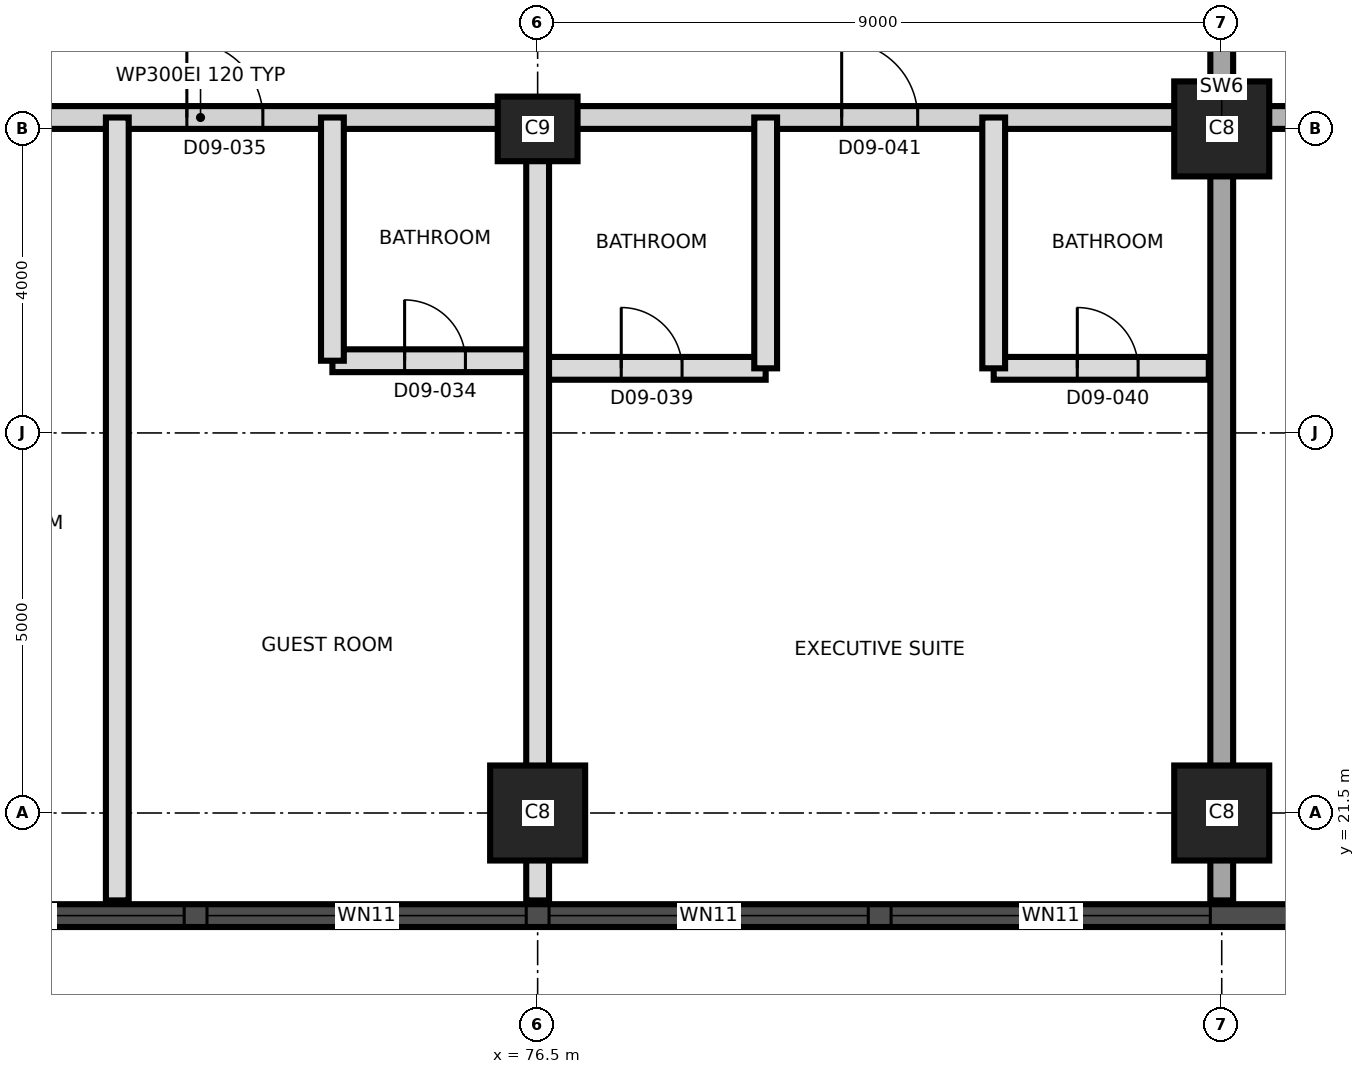
"""IFC4 building model, lengths in metres.
Left out: names, types, materials, properties, quantities, classifications, styles, units other than length and angle.
Written with IfcOpenShell. Run it as: python <this file> out.ifc"""

import sys

from ifc_helpers import new_model, si_unit, direction, frame, frame_2d, origin, origin_2d, place, context, subcontext, project, spatial, rectangle, extrude, element, fill, save


model = new_model("IFC4")
c1 = context("Model", 3, precision=1e-05, world=origin(), true_north=direction((0.0, 1.0)))
c2 = subcontext(c1, "Body", "Model", "MODEL_VIEW")
j1 = project(units=[si_unit("LENGTHUNIT", "METRE"), si_unit("PLANEANGLEUNIT", "RADIAN")], contexts=[c1])
p1 = place(None, origin())
s1 = spatial("IfcSite", under=j1, at=p1, CompositionType="ELEMENT")
p2 = place(p1, origin())
s2 = spatial("IfcBuilding", under=s1, at=p2, CompositionType="ELEMENT")
p3 = place(p2, frame((0.0, 0.0, 113.0)))
s3 = spatial("IfcBuildingStorey", under=s2, at=p3, CompositionType="ELEMENT", Elevation=113.0)
for number, where, z_axis, x_axis in (
    (1, (76.5, 21.5, 0.0), (0.0, 0.0, 1.0), (1.0, 0.0, 0.0)),
    (2, (85.5, 21.5, 0.0), (0.0, 0.0, 1.0), (1.0, 0.0, 0.0)),
):
    element("IfcColumn", number, at=place(p3, frame(where, z_axis=z_axis, x_axis=x_axis)), inside=s3, PredefinedType="COLUMN", context=c2, shape_type="SweptSolid", body=[
        extrude(rectangle(XDim=1.25, YDim=1.25, at=origin_2d()), origin(), (0.0, 0.0, 1.0), 3.7),
    ])
p4 = place(p3, frame((76.5, 30.5, 0.0), z_axis=(0.0, 0.0, 1.0), x_axis=(1.0, 0.0, 0.0)))
e3 = element("IfcColumn", 3, at=p4, inside=s3, PredefinedType="COLUMN", context=c2, shape_type="SweptSolid", body=[
    extrude(rectangle(XDim=1.05, YDim=0.85, at=origin_2d()), origin(), (0.0, 0.0, 1.0), 3.7),
])
p5 = place(p3, frame((85.5, 30.5, 0.0), z_axis=(0.0, 0.0, 1.0), x_axis=(1.0, 0.0, 0.0)))
e4 = element("IfcColumn", 4, at=p5, inside=s3, PredefinedType="COLUMN", context=c2, shape_type="SweptSolid", body=[
    extrude(rectangle(XDim=1.25, YDim=1.25, at=origin_2d()), origin(), (0.0, 0.0, 1.0), 3.7),
])
p6 = place(p3, frame((85.5, 20.35, 0.0), z_axis=(0.0, 0.0, 1.0), x_axis=(0.0, 1.0, 0.0)))
e5 = element("IfcWall", 5, at=p6, inside=s3, PredefinedType="SHEAR", context=c2, shape_type="SweptSolid", body=[
    extrude(rectangle(XDim=20.3, YDim=0.3, at=frame_2d((10.15, 0.0))), origin(), (0.0, 0.0, 1.0), 3.7),
])
p7 = place(p6, frame((11.35, 0.0, 0.0)))
e6 = element("IfcOpeningElement", 6, at=p7, cuts=e5, PredefinedType="OPENING", context=c2, shape_type="SweptSolid", body=[
    extrude(rectangle(XDim=1.4, YDim=2.1, at=frame_2d((0.7, 1.05))), frame((0.0, 0.16, 0.0), z_axis=(0.0, -1.0, 0.0), x_axis=(1.0, 0.0, 0.0)), (0.0, 0.0, 1.0), 0.32),
])
p8 = place(p3, frame((44.011, 20.15, 0.0), z_axis=(0.0, 0.0, 1.0), x_axis=(1.0, 0.0, 0.0)))
e7 = element("IfcWall", 7, at=p8, inside=s3, PredefinedType="SOLIDWALL", context=c2, shape_type="SweptSolid", body=[
    extrude(rectangle(XDim=43.476, YDim=0.3, at=frame_2d((21.738, 0.0))), origin(), (0.0, 0.0, 1.0), 3.4),
])
p9 = place(p8, frame((1.845, 0.0, 0.3)))
e8 = element("IfcOpeningElement", 8, at=p9, cuts=e7, PredefinedType="OPENING", context=c2, shape_type="SweptSolid", body=[
    extrude(rectangle(XDim=1.8, YDim=2.4, at=frame_2d((0.9, 1.2))), frame((0.0, 0.16, 0.0), z_axis=(0.0, -1.0, 0.0), x_axis=(1.0, 0.0, 0.0)), (0.0, 0.0, 1.0), 0.32),
])
p10 = place(p8, frame((5.639, 0.0, 0.9)))
e9 = element("IfcOpeningElement", 9, at=p10, cuts=e7, PredefinedType="OPENING", context=c2, shape_type="SweptSolid", body=[
    extrude(rectangle(XDim=4.2, YDim=1.5, at=frame_2d((2.1, 0.75))), frame((0.0, 0.16, 0.0), z_axis=(0.0, -1.0, 0.0), x_axis=(1.0, 0.0, 0.0)), (0.0, 0.0, 1.0), 0.32),
])
p11 = place(p8, frame((10.139, 0.0, 0.9)))
e10 = element("IfcOpeningElement", 10, at=p11, cuts=e7, PredefinedType="OPENING", context=c2, shape_type="SweptSolid", body=[
    extrude(rectangle(XDim=4.2, YDim=1.5, at=frame_2d((2.1, 0.75))), frame((0.0, 0.16, 0.0), z_axis=(0.0, -1.0, 0.0), x_axis=(1.0, 0.0, 0.0)), (0.0, 0.0, 1.0), 0.32),
])
p12 = place(p8, frame((14.639, 0.0, 0.9)))
e11 = element("IfcOpeningElement", 11, at=p12, cuts=e7, PredefinedType="OPENING", context=c2, shape_type="SweptSolid", body=[
    extrude(rectangle(XDim=4.2, YDim=1.5, at=frame_2d((2.1, 0.75))), frame((0.0, 0.16, 0.0), z_axis=(0.0, -1.0, 0.0), x_axis=(1.0, 0.0, 0.0)), (0.0, 0.0, 1.0), 0.32),
])
p13 = place(p8, frame((19.139, 0.0, 0.9)))
e12 = element("IfcOpeningElement", 12, at=p13, cuts=e7, PredefinedType="OPENING", context=c2, shape_type="SweptSolid", body=[
    extrude(rectangle(XDim=4.2, YDim=1.5, at=frame_2d((2.1, 0.75))), frame((0.0, 0.16, 0.0), z_axis=(0.0, -1.0, 0.0), x_axis=(1.0, 0.0, 0.0)), (0.0, 0.0, 1.0), 0.32),
])
p14 = place(p8, frame((23.639, 0.0, 0.9)))
e13 = element("IfcOpeningElement", 13, at=p14, cuts=e7, PredefinedType="OPENING", context=c2, shape_type="SweptSolid", body=[
    extrude(rectangle(XDim=4.2, YDim=1.5, at=frame_2d((2.1, 0.75))), frame((0.0, 0.16, 0.0), z_axis=(0.0, -1.0, 0.0), x_axis=(1.0, 0.0, 0.0)), (0.0, 0.0, 1.0), 0.32),
])
p15 = place(p8, frame((28.139, 0.0, 0.9)))
e14 = element("IfcOpeningElement", 14, at=p15, cuts=e7, PredefinedType="OPENING", context=c2, shape_type="SweptSolid", body=[
    extrude(rectangle(XDim=4.2, YDim=1.5, at=frame_2d((2.1, 0.75))), frame((0.0, 0.16, 0.0), z_axis=(0.0, -1.0, 0.0), x_axis=(1.0, 0.0, 0.0)), (0.0, 0.0, 1.0), 0.32),
])
p16 = place(p8, frame((32.639, 0.0, 0.9)))
e15 = element("IfcOpeningElement", 15, at=p16, cuts=e7, PredefinedType="OPENING", context=c2, shape_type="SweptSolid", body=[
    extrude(rectangle(XDim=4.2, YDim=1.5, at=frame_2d((2.1, 0.75))), frame((0.0, 0.16, 0.0), z_axis=(0.0, -1.0, 0.0), x_axis=(1.0, 0.0, 0.0)), (0.0, 0.0, 1.0), 0.32),
])
p17 = place(p8, frame((37.139, 0.0, 0.9)))
e16 = element("IfcOpeningElement", 16, at=p17, cuts=e7, PredefinedType="OPENING", context=c2, shape_type="SweptSolid", body=[
    extrude(rectangle(XDim=4.2, YDim=1.5, at=frame_2d((2.1, 0.75))), frame((0.0, 0.16, 0.0), z_axis=(0.0, -1.0, 0.0), x_axis=(1.0, 0.0, 0.0)), (0.0, 0.0, 1.0), 0.32),
])
p18 = place(p3, frame((76.5, 27.35, 0.0), z_axis=(0.0, 0.0, 1.0), x_axis=(1.0, 0.0, 0.0)))
e17 = element("IfcWall", 17, at=p18, inside=s3, PredefinedType="PARTITIONING", context=c2, shape_type="SweptSolid", body=[
    extrude(rectangle(XDim=3.0, YDim=0.3, at=frame_2d((1.5, 0.0))), origin(), (0.0, 0.0, 1.0), 3.4),
])
p19 = place(p18, frame((1.1, 0.0, 0.0)))
e18 = element("IfcOpeningElement", 18, at=p19, cuts=e17, PredefinedType="OPENING", context=c2, shape_type="SweptSolid", body=[
    extrude(rectangle(XDim=0.8, YDim=2.1, at=frame_2d((0.4, 1.05))), frame((0.0, 0.16, 0.0), z_axis=(0.0, -1.0, 0.0), x_axis=(1.0, 0.0, 0.0)), (0.0, 0.0, 1.0), 0.32),
])
p20 = place(p3, frame((82.5, 27.35, 0.0), z_axis=(0.0, 0.0, 1.0), x_axis=(1.0, 0.0, 0.0)))
e19 = element("IfcWall", 19, at=p20, inside=s3, PredefinedType="PARTITIONING", context=c2, shape_type="SweptSolid", body=[
    extrude(rectangle(XDim=2.83, YDim=0.3, at=frame_2d((1.415, 0.0))), origin(), (0.0, 0.0, 1.0), 3.4),
])
p21 = place(p20, frame((1.1, 0.0, 0.0)))
e20 = element("IfcOpeningElement", 20, at=p21, cuts=e19, PredefinedType="OPENING", context=c2, shape_type="SweptSolid", body=[
    extrude(rectangle(XDim=0.8, YDim=2.1, at=frame_2d((0.4, 1.05))), frame((0.0, 0.16, 0.0), z_axis=(0.0, -1.0, 0.0), x_axis=(1.0, 0.0, 0.0)), (0.0, 0.0, 1.0), 0.32),
])
p22 = place(p3, frame((73.8, 27.45, 0.0), z_axis=(0.0, 0.0, 1.0), x_axis=(1.0, 0.0, 0.0)))
e21 = element("IfcWall", 21, at=p22, inside=s3, PredefinedType="PARTITIONING", context=c2, shape_type="SweptSolid", body=[
    extrude(rectangle(XDim=2.7, YDim=0.3, at=frame_2d((1.35, 0.0))), origin(), (0.0, 0.0, 1.0), 3.4),
])
p23 = place(p22, frame((0.95, 0.0, 0.0)))
e22 = element("IfcOpeningElement", 22, at=p23, cuts=e21, PredefinedType="OPENING", context=c2, shape_type="SweptSolid", body=[
    extrude(rectangle(XDim=0.8, YDim=2.1, at=frame_2d((0.4, 1.05))), frame((0.0, 0.16, 0.0), z_axis=(0.0, -1.0, 0.0), x_axis=(1.0, 0.0, 0.0)), (0.0, 0.0, 1.0), 0.32),
])
p24 = place(p3, frame((58.8, 30.65, 0.0), z_axis=(0.0, 0.0, 1.0), x_axis=(1.0, 0.0, 0.0)))
e23 = element("IfcWall", 23, at=p24, inside=s3, PredefinedType="PARTITIONING", context=c2, shape_type="SweptSolid", body=[
    extrude(rectangle(XDim=26.53, YDim=0.3, at=frame_2d((13.265, 0.0))), origin(), (0.0, 0.0, 1.0), 3.4),
])
p25 = place(p24, frame((3.115, 0.0, 0.0)))
e24 = element("IfcOpeningElement", 24, at=p25, cuts=e23, PredefinedType="OPENING", context=c2, shape_type="SweptSolid", body=[
    extrude(rectangle(XDim=1.0, YDim=2.1, at=frame_2d((0.5, 1.05))), frame((0.0, 0.16, 0.0), z_axis=(0.0, -1.0, 0.0), x_axis=(1.0, 0.0, 0.0)), (0.0, 0.0, 1.0), 0.32),
])
p26 = place(p24, frame((6.065, 0.0, 0.0)))
e25 = element("IfcOpeningElement", 25, at=p26, cuts=e23, PredefinedType="OPENING", context=c2, shape_type="SweptSolid", body=[
    extrude(rectangle(XDim=1.4, YDim=2.1, at=frame_2d((0.7, 1.05))), frame((0.0, 0.16, 0.0), z_axis=(0.0, -1.0, 0.0), x_axis=(1.0, 0.0, 0.0)), (0.0, 0.0, 1.0), 0.32),
])
p27 = place(p24, frame((9.835, 0.0, 0.0)))
e26 = element("IfcOpeningElement", 26, at=p27, cuts=e23, PredefinedType="OPENING", context=c2, shape_type="SweptSolid", body=[
    extrude(rectangle(XDim=1.2, YDim=2.1, at=frame_2d((0.6, 1.05))), frame((0.0, 0.16, 0.0), z_axis=(0.0, -1.0, 0.0), x_axis=(1.0, 0.0, 0.0)), (0.0, 0.0, 1.0), 0.32),
])
p28 = place(p24, frame((13.085, 0.0, 0.0)))
e27 = element("IfcOpeningElement", 27, at=p28, cuts=e23, PredefinedType="OPENING", context=c2, shape_type="SweptSolid", body=[
    extrude(rectangle(XDim=1.0, YDim=2.1, at=frame_2d((0.5, 1.05))), frame((0.0, 0.16, 0.0), z_axis=(0.0, -1.0, 0.0), x_axis=(1.0, 0.0, 0.0)), (0.0, 0.0, 1.0), 0.32),
])
p29 = place(p24, frame((21.7, 0.0, 0.0)))
e28 = element("IfcOpeningElement", 28, at=p29, cuts=e23, PredefinedType="OPENING", context=c2, shape_type="SweptSolid", body=[
    extrude(rectangle(XDim=1.0, YDim=2.4, at=frame_2d((0.5, 1.2))), frame((0.0, 0.16, 0.0), z_axis=(0.0, -1.0, 0.0), x_axis=(1.0, 0.0, 0.0)), (0.0, 0.0, 1.0), 0.32),
])
p30 = place(p3, frame((85.67, 30.65, 0.0), z_axis=(0.0, 0.0, 1.0), x_axis=(1.0, 0.0, 0.0)))
e29 = element("IfcWall", 29, at=p30, inside=s3, PredefinedType="SHEAR", context=c2, shape_type="SweptSolid", body=[
    extrude(rectangle(XDim=9.58, YDim=0.3, at=frame_2d((4.79, 0.0))), origin(), (0.0, 0.0, 1.0), 3.4),
])
p31 = place(p30, frame((2.08, 0.0, 0.0)))
e30 = element("IfcOpeningElement", 30, at=p31, cuts=e29, PredefinedType="OPENING", context=c2, shape_type="SweptSolid", body=[
    extrude(rectangle(XDim=1.2, YDim=2.1, at=frame_2d((0.6, 1.05))), frame((0.0, 0.16, 0.0), z_axis=(0.0, -1.0, 0.0), x_axis=(1.0, 0.0, 0.0)), (0.0, 0.0, 1.0), 0.32),
])
p32 = place(p30, frame((5.63, 0.0, 0.0)))
e31 = element("IfcOpeningElement", 31, at=p32, cuts=e29, PredefinedType="OPENING", context=c2, shape_type="SweptSolid", body=[
    extrude(rectangle(XDim=1.0, YDim=2.1, at=frame_2d((0.5, 1.05))), frame((0.0, 0.16, 0.0), z_axis=(0.0, -1.0, 0.0), x_axis=(1.0, 0.0, 0.0)), (0.0, 0.0, 1.0), 0.32),
])
p33 = place(p3, frame((70.97, 20.35, 0.0), z_axis=(0.0, 0.0, 1.0), x_axis=(0.0, 1.0, 0.0)))
e32 = element("IfcWall", 32, at=p33, inside=s3, PredefinedType="PARTITIONING", context=c2, shape_type="SweptSolid", body=[
    extrude(rectangle(XDim=10.3, YDim=0.3, at=frame_2d((5.15, 0.0))), origin(), (0.0, 0.0, 1.0), 3.4),
])
p34 = place(p3, frame((73.8, 27.45, 0.0), z_axis=(0.0, 0.0, 1.0), x_axis=(0.0, 1.0, 0.0)))
e33 = element("IfcWall", 33, at=p34, inside=s3, PredefinedType="PARTITIONING", context=c2, shape_type="SweptSolid", body=[
    extrude(rectangle(XDim=3.2, YDim=0.3, at=frame_2d((1.6, 0.0))), origin(), (0.0, 0.0, 1.0), 3.4),
])
p35 = place(p3, frame((76.5, 20.35, 0.0), z_axis=(0.0, 0.0, 1.0), x_axis=(0.0, 1.0, 0.0)))
e34 = element("IfcWall", 34, at=p35, inside=s3, PredefinedType="PARTITIONING", context=c2, shape_type="SweptSolid", body=[
    extrude(rectangle(XDim=10.3, YDim=0.3, at=frame_2d((5.15, 0.0))), origin(), (0.0, 0.0, 1.0), 3.4),
])
for number, where, z_axis, x_axis in (
    (35, (79.5, 27.35, 0.0), (0.0, 0.0, 1.0), (0.0, 1.0, 0.0)),
    (36, (82.5, 27.35, 0.0), (0.0, 0.0, 1.0), (0.0, 1.0, 0.0)),
):
    element("IfcWall", number, at=place(p3, frame(where, z_axis=z_axis, x_axis=x_axis)), inside=s3, PredefinedType="PARTITIONING", context=c2, shape_type="SweptSolid", body=[
        extrude(rectangle(XDim=3.3, YDim=0.3, at=frame_2d((1.65, 0.0))), origin(), (0.0, 0.0, 1.0), 3.4),
    ])
p36 = place(p14, origin())
e37 = element("IfcWindow", 37, at=p36, inside=s3, PartitioningType="SINGLE_PANEL", PredefinedType="WINDOW", context=c2, shape_type="SweptSolid", body=[
    extrude(rectangle(XDim=4.2, YDim=1.5, at=frame_2d((2.1, 0.75))), frame((0.0, 0.03, 0.0), z_axis=(0.0, -1.0, 0.0), x_axis=(1.0, 0.0, 0.0)), (0.0, 0.0, 1.0), 0.06),
])
fill(e13, e37)
p37 = place(p15, origin())
e38 = element("IfcWindow", 38, at=p37, inside=s3, PartitioningType="SINGLE_PANEL", PredefinedType="WINDOW", context=c2, shape_type="SweptSolid", body=[
    extrude(rectangle(XDim=4.2, YDim=1.5, at=frame_2d((2.1, 0.75))), frame((0.0, 0.03, 0.0), z_axis=(0.0, -1.0, 0.0), x_axis=(1.0, 0.0, 0.0)), (0.0, 0.0, 1.0), 0.06),
])
fill(e14, e38)
p38 = place(p16, origin())
e39 = element("IfcWindow", 39, at=p38, inside=s3, PartitioningType="SINGLE_PANEL", PredefinedType="WINDOW", context=c2, shape_type="SweptSolid", body=[
    extrude(rectangle(XDim=4.2, YDim=1.5, at=frame_2d((2.1, 0.75))), frame((0.0, 0.03, 0.0), z_axis=(0.0, -1.0, 0.0), x_axis=(1.0, 0.0, 0.0)), (0.0, 0.0, 1.0), 0.06),
])
fill(e15, e39)
p39 = place(p17, origin())
e40 = element("IfcWindow", 40, at=p39, inside=s3, PartitioningType="SINGLE_PANEL", PredefinedType="WINDOW", context=c2, shape_type="SweptSolid", body=[
    extrude(rectangle(XDim=4.2, YDim=1.5, at=frame_2d((2.1, 0.75))), frame((0.0, 0.03, 0.0), z_axis=(0.0, -1.0, 0.0), x_axis=(1.0, 0.0, 0.0)), (0.0, 0.0, 1.0), 0.06),
])
fill(e16, e40)
p40 = place(p23, origin())
e41 = element("IfcDoor", 41, at=p40, inside=s3, OperationType="SINGLE_SWING_RIGHT", PredefinedType="DOOR", context=c2, shape_type="SweptSolid", body=[
    extrude(rectangle(XDim=0.8, YDim=2.1, at=frame_2d((0.4, 1.05))), frame((0.0, 0.025, 0.0), z_axis=(0.0, -1.0, 0.0), x_axis=(1.0, 0.0, 0.0)), (0.0, 0.0, 1.0), 0.05),
])
fill(e22, e41)
p41 = place(p28, origin())
e42 = element("IfcDoor", 42, at=p41, inside=s3, OperationType="SINGLE_SWING_LEFT", PredefinedType="DOOR", context=c2, shape_type="SweptSolid", body=[
    extrude(rectangle(XDim=1.0, YDim=2.1, at=frame_2d((0.5, 1.05))), frame((0.0, 0.025, 0.0), z_axis=(0.0, -1.0, 0.0), x_axis=(1.0, 0.0, 0.0)), (0.0, 0.0, 1.0), 0.05),
])
fill(e27, e42)
p42 = place(p19, origin())
e43 = element("IfcDoor", 43, at=p42, inside=s3, OperationType="SINGLE_SWING_LEFT", PredefinedType="DOOR", context=c2, shape_type="SweptSolid", body=[
    extrude(rectangle(XDim=0.8, YDim=2.1, at=frame_2d((0.4, 1.05))), frame((0.0, 0.025, 0.0), z_axis=(0.0, -1.0, 0.0), x_axis=(1.0, 0.0, 0.0)), (0.0, 0.0, 1.0), 0.05),
])
fill(e18, e43)
p43 = place(p21, origin())
e44 = element("IfcDoor", 44, at=p43, inside=s3, OperationType="SINGLE_SWING_RIGHT", PredefinedType="DOOR", context=c2, shape_type="SweptSolid", body=[
    extrude(rectangle(XDim=0.8, YDim=2.1, at=frame_2d((0.4, 1.05))), frame((0.0, 0.025, 0.0), z_axis=(0.0, -1.0, 0.0), x_axis=(1.0, 0.0, 0.0)), (0.0, 0.0, 1.0), 0.05),
])
fill(e20, e44)
p44 = place(p29, origin())
e45 = element("IfcDoor", 45, at=p44, inside=s3, OperationType="SINGLE_SWING_LEFT", PredefinedType="DOOR", context=c2, shape_type="SweptSolid", body=[
    extrude(rectangle(XDim=1.0, YDim=2.4, at=frame_2d((0.5, 1.2))), frame((0.0, 0.025, 0.0), z_axis=(0.0, -1.0, 0.0), x_axis=(1.0, 0.0, 0.0)), (0.0, 0.0, 1.0), 0.05),
])
fill(e28, e45)
save(model, sys.argv[1])
